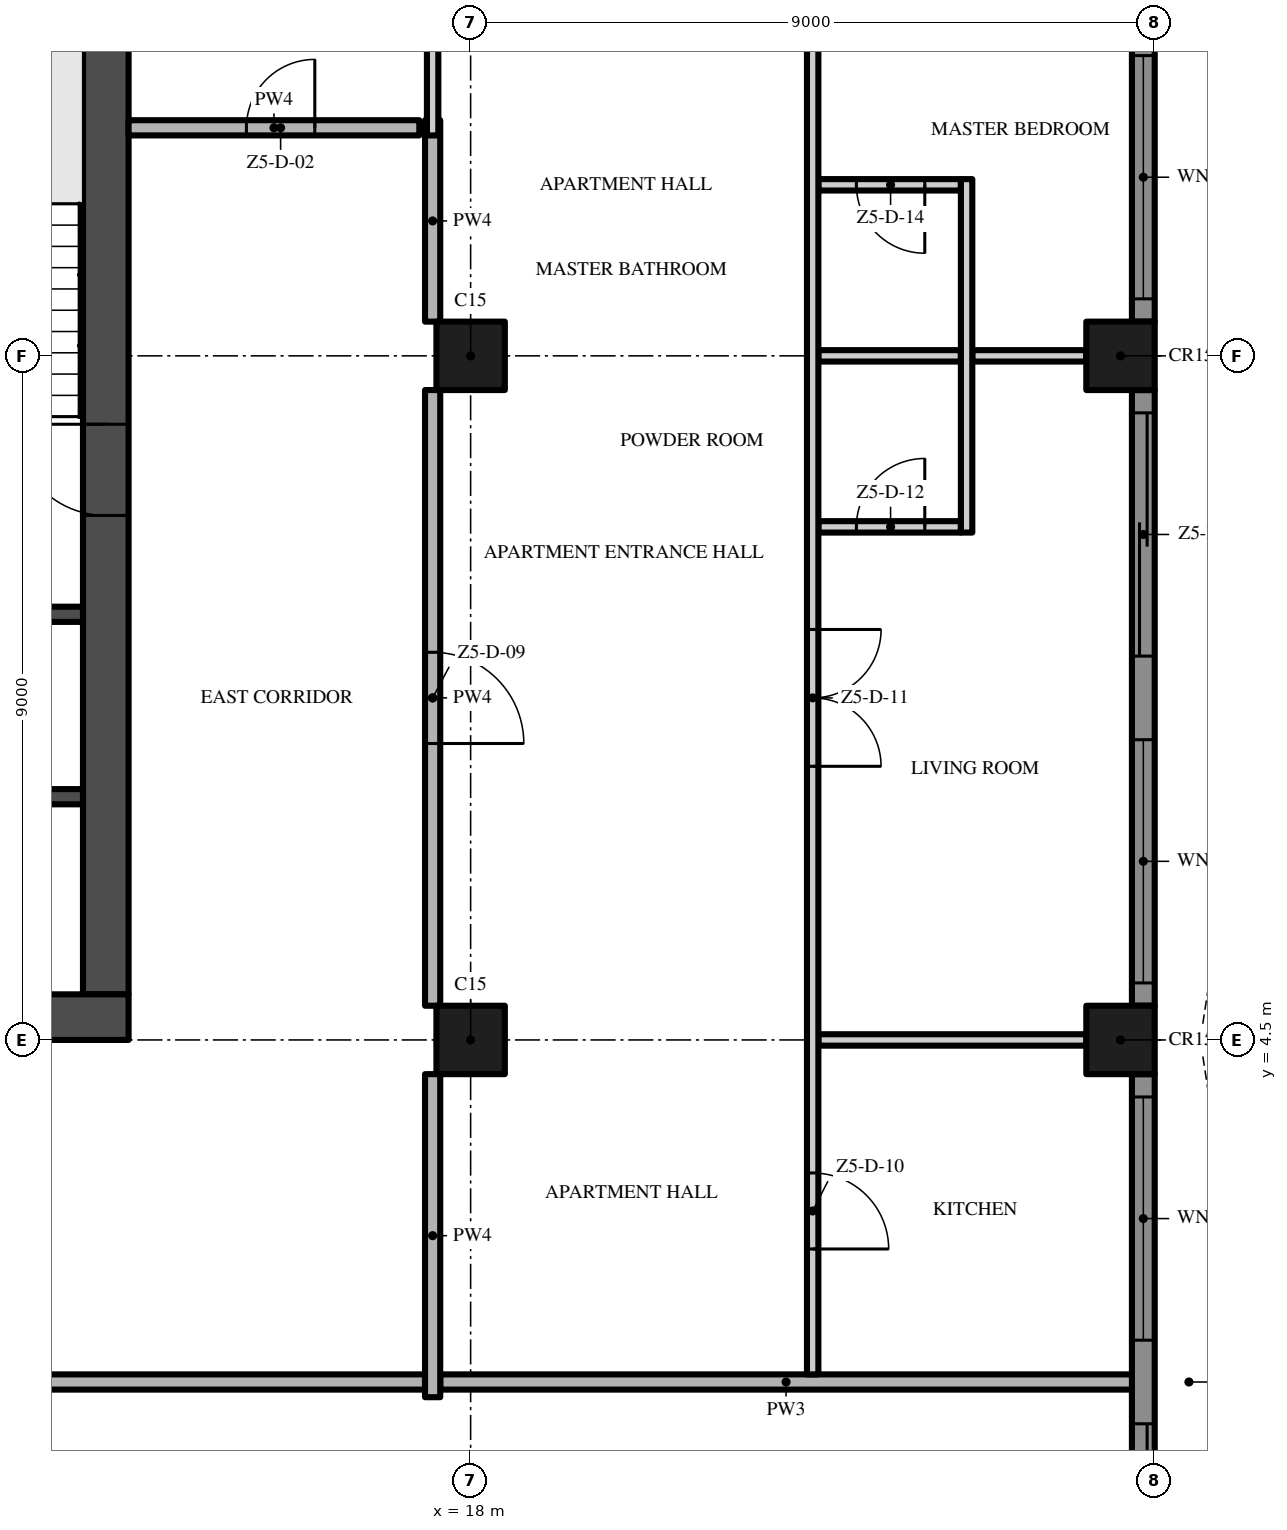
"""IFC4 building model, lengths in metres.
Left out: names, types, materials, properties, quantities, classifications, styles, units other than length and angle.
Written with IfcOpenShell. Run it as: python <this file> out.ifc"""

import sys

from ifc_helpers import new_model, si_unit, direction, frame, frame_2d, origin, origin_2d, place, context, subcontext, project, spatial, polyline, rectangle, outline, extrude, element, fill, save


model = new_model("IFC4")
c1 = context("Model", 3, precision=1e-05, world=origin(), true_north=direction((0.0, 1.0)))
c2 = subcontext(c1, "Body", "Model", "MODEL_VIEW")
j1 = project(units=[si_unit("LENGTHUNIT", "METRE"), si_unit("PLANEANGLEUNIT", "RADIAN")], contexts=[c1])
p1 = place(None, origin())
s1 = spatial("IfcSite", under=j1, at=p1, CompositionType="ELEMENT")
p2 = place(p1, origin())
s2 = spatial("IfcBuilding", under=s1, at=p2, CompositionType="ELEMENT")
p3 = place(p2, frame((0.0, 0.0, 280.6)))
s3 = spatial("IfcBuildingStorey", under=s2, at=p3, CompositionType="ELEMENT", Elevation=280.6)
p4 = place(p3, frame((-13.5, 4.8, -0.3), z_axis=(0.0, 0.0, 1.0), x_axis=(1.0, 0.0, 0.0)))
e1 = element("IfcWall", 1, at=p4, inside=s3, PredefinedType="SHEAR", context=c2, shape_type="SweptSolid", body=[
    extrude(rectangle(XDim=27.0, YDim=0.6, at=frame_2d((13.5, 0.0))), origin(), (0.0, 0.0, 1.0), 3.8),
])
p5 = place(p4, frame((12.0, 0.0, 0.3)))
e2 = element("IfcOpeningElement", 2, at=p5, cuts=e1, PredefinedType="OPENING", context=c2, shape_type="SweptSolid", body=[
    extrude(rectangle(XDim=3.0, YDim=2.4, at=frame_2d((1.5, 1.2))), frame((0.0, 0.31, 0.0), z_axis=(0.0, -1.0, 0.0), x_axis=(1.0, 0.0, 0.0)), (0.0, 0.0, 1.0), 0.62),
])
p6 = place(p4, frame((4.9, 0.0, 0.3)))
e3 = element("IfcOpeningElement", 3, at=p6, cuts=e1, PredefinedType="OPENING", context=c2, shape_type="SweptSolid", body=[
    extrude(rectangle(XDim=1.2, YDim=2.2, at=frame_2d((0.6, 1.1))), frame((0.0, 0.31, 0.0), z_axis=(0.0, -1.0, 0.0), x_axis=(1.0, 0.0, 0.0)), (0.0, 0.0, 1.0), 0.62),
])
p7 = place(p4, frame((20.75, 0.0, 0.3)))
e4 = element("IfcOpeningElement", 4, at=p7, cuts=e1, PredefinedType="OPENING", context=c2, shape_type="SweptSolid", body=[
    extrude(rectangle(XDim=1.5, YDim=2.2, at=frame_2d((0.75, 1.1))), frame((0.0, 0.31, 0.0), z_axis=(0.0, -1.0, 0.0), x_axis=(1.0, 0.0, 0.0)), (0.0, 0.0, 1.0), 0.62),
])
p8 = place(p4, frame((17.4, 0.0, 0.3)))
e5 = element("IfcOpeningElement", 5, at=p8, cuts=e1, PredefinedType="OPENING", context=c2, shape_type="SweptSolid", body=[
    extrude(rectangle(XDim=1.2, YDim=2.2, at=frame_2d((0.6, 1.1))), frame((0.0, 0.31, 0.0), z_axis=(0.0, -1.0, 0.0), x_axis=(1.0, 0.0, 0.0)), (0.0, 0.0, 1.0), 0.62),
])
p9 = place(p3, frame((13.2, 5.1, -0.3), z_axis=(0.0, 0.0, 1.0), x_axis=(0.0, 1.0, 0.0)))
e6 = element("IfcWall", 6, at=p9, inside=s3, PredefinedType="SHEAR", context=c2, shape_type="SweptSolid", body=[
    extrude(rectangle(XDim=16.8, YDim=0.6, at=frame_2d((8.4, 0.0))), origin(), (0.0, 0.0, 1.0), 3.8),
])
p10 = place(p9, frame((6.3, 0.0, 0.3)))
e7 = element("IfcOpeningElement", 7, at=p10, cuts=e6, PredefinedType="OPENING", context=c2, shape_type="SweptSolid", body=[
    extrude(rectangle(XDim=1.2, YDim=2.2, at=frame_2d((0.6, 1.1))), frame((0.0, 0.31, 0.0), z_axis=(0.0, -1.0, 0.0), x_axis=(1.0, 0.0, 0.0)), (0.0, 0.0, 1.0), 0.62),
])
for number, where, z_axis, x_axis in (
    (8, (18.0, 13.5, 0.0), (0.0, 0.0, 1.0), (1.0, 0.0, 0.0)),
    (9, (18.0, 4.5, 0.0), (0.0, 0.0, 1.0), (1.0, 0.0, 0.0)),
    (10, (26.55, 13.5, 0.0), (0.0, 0.0, 1.0), (1.0, 0.0, 0.0)),
    (11, (26.55, 4.5, 0.0), (0.0, 0.0, 1.0), (1.0, 0.0, 0.0)),
):
    element("IfcColumn", number, at=place(p3, frame(where, z_axis=z_axis, x_axis=x_axis)), inside=s3, PredefinedType="COLUMN", context=c2, shape_type="SweptSolid", body=[
        extrude(rectangle(XDim=0.9, YDim=0.9, at=origin_2d()), origin(), (0.0, 0.0, 1.0), 3.5),
    ])
p11 = place(p3, frame((26.85, 4.05, 0.0), z_axis=(0.0, 0.0, 1.0), x_axis=(0.0, -1.0, 0.0)))
e12 = element("IfcWall", 12, at=p11, inside=s3, PredefinedType="SOLIDWALL", context=c2, shape_type="SweptSolid", body=[
    extrude(rectangle(XDim=8.1, YDim=0.3, at=frame_2d((4.05, 0.0))), origin(), (0.0, 0.0, 1.0), 3.5),
])
p12 = place(p11, frame((4.6, 0.0, 0.0)))
e13 = element("IfcOpeningElement", 13, at=p12, cuts=e12, PredefinedType="OPENING", context=c2, shape_type="SweptSolid", body=[
    extrude(rectangle(XDim=3.2, YDim=2.4, at=frame_2d((1.6, 1.2))), frame((0.0, 0.16, 0.0), z_axis=(0.0, -1.0, 0.0), x_axis=(1.0, 0.0, 0.0)), (0.0, 0.0, 1.0), 0.32),
])
p13 = place(p11, frame((0.3, 0.0, 0.45)))
e14 = element("IfcOpeningElement", 14, at=p13, cuts=e12, PredefinedType="OPENING", context=c2, shape_type="SweptSolid", body=[
    extrude(rectangle(XDim=3.2, YDim=2.65, at=frame_2d((1.6, 1.325))), frame((0.0, 0.16, 0.0), z_axis=(0.0, -1.0, 0.0), x_axis=(1.0, 0.0, 0.0)), (0.0, 0.0, 1.0), 0.32),
])
p14 = place(p3, frame((26.85, 13.05, 0.0), z_axis=(0.0, 0.0, 1.0), x_axis=(0.0, -1.0, 0.0)))
e15 = element("IfcWall", 15, at=p14, inside=s3, PredefinedType="SOLIDWALL", context=c2, shape_type="SweptSolid", body=[
    extrude(rectangle(XDim=8.1, YDim=0.3, at=frame_2d((4.05, 0.0))), origin(), (0.0, 0.0, 1.0), 3.5),
])
p15 = place(p14, frame((4.6, 0.0, 0.45)))
e16 = element("IfcOpeningElement", 16, at=p15, cuts=e15, PredefinedType="OPENING", context=c2, shape_type="SweptSolid", body=[
    extrude(rectangle(XDim=3.2, YDim=2.65, at=frame_2d((1.6, 1.325))), frame((0.0, 0.16, 0.0), z_axis=(0.0, -1.0, 0.0), x_axis=(1.0, 0.0, 0.0)), (0.0, 0.0, 1.0), 0.32),
])
p16 = place(p14, frame((0.3, 0.0, 0.0)))
e17 = element("IfcOpeningElement", 17, at=p16, cuts=e15, PredefinedType="OPENING", context=c2, shape_type="SweptSolid", body=[
    extrude(rectangle(XDim=3.2, YDim=2.4, at=frame_2d((1.6, 1.2))), frame((0.0, 0.16, 0.0), z_axis=(0.0, -1.0, 0.0), x_axis=(1.0, 0.0, 0.0)), (0.0, 0.0, 1.0), 0.32),
])
p17 = place(p3, frame((26.85, 18.0, 0.0), z_axis=(0.0, 0.0, 1.0), x_axis=(0.0, -1.0, 0.0)))
e18 = element("IfcWall", 18, at=p17, inside=s3, PredefinedType="SOLIDWALL", context=c2, shape_type="SweptSolid", body=[
    extrude(rectangle(XDim=4.05, YDim=0.3, at=frame_2d((2.025, 0.0))), origin(), (0.0, 0.0, 1.0), 3.5),
])
p18 = place(p17, frame((0.55, 0.0, 0.45)))
e19 = element("IfcOpeningElement", 19, at=p18, cuts=e18, PredefinedType="OPENING", context=c2, shape_type="SweptSolid", body=[
    extrude(rectangle(XDim=3.2, YDim=2.65, at=frame_2d((1.6, 1.325))), frame((0.0, 0.16, 0.0), z_axis=(0.0, -1.0, 0.0), x_axis=(1.0, 0.0, 0.0)), (0.0, 0.0, 1.0), 0.32),
])
p19 = place(p3, origin())
e20 = element("IfcWall", 20, at=p19, inside=s3, PredefinedType="USERDEFINED", context=c2, shape_type="SweptSolid", body=[
    extrude(outline(polyline([(30.0, -18.0), (29.771, -16.5), (29.171, -15.0), (28.429, -13.5), (27.829, -12.0), (27.6, -10.5), (27.829, -9.0), (28.429, -7.5), (29.171, -6.0), (29.771, -4.5), (30.0, -3.0), (29.771, -1.5), (29.171, 0.0), (28.429, 1.5), (27.829, 3.0), (27.6, 4.5), (27.829, 6.0), (28.429, 7.5), (29.171, 9.0), (29.771, 10.5), (30.0, 12.0), (29.771, 13.5), (29.171, 15.0), (28.429, 16.5), (27.829, 18.0), (27.597, 17.907), (28.201, 16.398), (28.942, 14.898), (29.528, 13.434), (29.747, 12.0), (29.528, 10.566), (28.942, 9.102), (28.201, 7.602), (27.586, 6.066), (27.347, 4.5), (27.586, 2.934), (28.201, 1.398), (28.942, -0.102), (29.528, -1.566), (29.747, -3.0), (29.528, -4.434), (28.942, -5.898), (28.201, -7.398), (27.586, -8.934), (27.347, -10.5), (27.586, -12.066), (28.201, -13.602), (28.942, -15.102), (29.528, -16.566), (29.753, -18.038), (30.0, -18.0)])), origin(), (0.0, 0.0, 1.0), 0.9),
])
for number, where, z_axis, x_axis in (
    (21, (9.65, 7.7, 0.0), (0.0, 0.0, 1.0), (1.0, 0.0, 0.0)),
    (22, (9.65, 10.1, 0.0), (0.0, 0.0, 1.0), (1.0, 0.0, 0.0)),
):
    element("IfcWall", number, at=place(p3, frame(where, z_axis=z_axis, x_axis=x_axis)), inside=s3, PredefinedType="SHEAR", context=c2, shape_type="SweptSolid", body=[
        extrude(rectangle(XDim=3.25, YDim=0.2, at=frame_2d((1.625, 0.0))), origin(), (0.0, 0.0, 1.0), 3.5),
    ])
p20 = place(p3, frame((17.4, 0.0, 0.0), z_axis=(0.0, 0.0, 1.0), x_axis=(-1.0, 0.0, 0.0)))
e23 = element("IfcWall", 23, at=p20, inside=s3, PredefinedType="PARTITIONING", context=c2, shape_type="SweptSolid", body=[
    extrude(rectangle(XDim=34.8, YDim=0.2, at=frame_2d((17.4, 0.0))), origin(), (0.0, 0.0, 1.0), 3.5),
])
p21 = place(p20, frame((25.65, 0.0, 0.0)))
e24 = element("IfcOpeningElement", 24, at=p21, cuts=e23, PredefinedType="OPENING", context=c2, shape_type="SweptSolid", body=[
    extrude(rectangle(XDim=1.5, YDim=2.4, at=frame_2d((0.75, 1.2))), frame((0.0, 0.11, 0.0), z_axis=(0.0, -1.0, 0.0), x_axis=(1.0, 0.0, 0.0)), (0.0, 0.0, 1.0), 0.22),
])
p22 = place(p20, frame((7.65, 0.0, 0.0)))
e25 = element("IfcOpeningElement", 25, at=p22, cuts=e23, PredefinedType="OPENING", context=c2, shape_type="SweptSolid", body=[
    extrude(rectangle(XDim=1.5, YDim=2.4, at=frame_2d((0.75, 1.2))), frame((0.0, 0.11, 0.0), z_axis=(0.0, -1.0, 0.0), x_axis=(1.0, 0.0, 0.0)), (0.0, 0.0, 1.0), 0.22),
])
p23 = place(p3, frame((17.6, 0.0, 0.0), z_axis=(0.0, 0.0, 1.0), x_axis=(1.0, 0.0, 0.0)))
e26 = element("IfcWall", 26, at=p23, inside=s3, PredefinedType="PARTITIONING", context=c2, shape_type="SweptSolid", body=[
    extrude(rectangle(XDim=9.1, YDim=0.2, at=frame_2d((4.55, 0.0))), origin(), (0.0, 0.0, 1.0), 3.5),
])
p24 = place(p3, frame((22.575, 4.5, 0.0), z_axis=(0.0, 0.0, 1.0), x_axis=(1.0, 0.0, 0.0)))
e27 = element("IfcWall", 27, at=p24, inside=s3, PredefinedType="PARTITIONING", context=c2, shape_type="SweptSolid", body=[
    extrude(rectangle(XDim=3.525, YDim=0.15, at=frame_2d((1.762, 0.0))), origin(), (0.0, 0.0, 1.0), 3.5),
])
p25 = place(p3, frame((22.575, 11.25, 0.0), z_axis=(0.0, 0.0, 1.0), x_axis=(1.0, 0.0, 0.0)))
e28 = element("IfcWall", 28, at=p25, inside=s3, PredefinedType="PARTITIONING", context=c2, shape_type="SweptSolid", body=[
    extrude(rectangle(XDim=1.875, YDim=0.15, at=frame_2d((0.938, 0.0))), origin(), (0.0, 0.0, 1.0), 3.5),
])
p26 = place(p25, frame((0.5, 0.0, 0.0)))
e29 = element("IfcOpeningElement", 29, at=p26, cuts=e28, PredefinedType="OPENING", context=c2, shape_type="SweptSolid", body=[
    extrude(rectangle(XDim=0.9, YDim=2.1, at=frame_2d((0.45, 1.05))), frame((0.0, 0.085, 0.0), z_axis=(0.0, -1.0, 0.0), x_axis=(1.0, 0.0, 0.0)), (0.0, 0.0, 1.0), 0.17),
])
p27 = place(p3, frame((22.575, 13.5, 0.0), z_axis=(0.0, 0.0, 1.0), x_axis=(1.0, 0.0, 0.0)))
e30 = element("IfcWall", 30, at=p27, inside=s3, PredefinedType="PARTITIONING", context=c2, shape_type="SweptSolid", body=[
    extrude(rectangle(XDim=1.875, YDim=0.15, at=frame_2d((0.938, 0.0))), origin(), (0.0, 0.0, 1.0), 3.5),
])
p28 = place(p3, frame((24.6, 13.5, 0.0), z_axis=(0.0, 0.0, 1.0), x_axis=(1.0, 0.0, 0.0)))
e31 = element("IfcWall", 31, at=p28, inside=s3, PredefinedType="PARTITIONING", context=c2, shape_type="SweptSolid", body=[
    extrude(rectangle(XDim=1.5, YDim=0.15, at=frame_2d((0.75, 0.0))), origin(), (0.0, 0.0, 1.0), 3.5),
])
p29 = place(p3, frame((24.45, 15.75, 0.0), z_axis=(0.0, 0.0, 1.0), x_axis=(-1.0, 0.0, 0.0)))
e32 = element("IfcWall", 32, at=p29, inside=s3, PredefinedType="PARTITIONING", context=c2, shape_type="SweptSolid", body=[
    extrude(rectangle(XDim=1.875, YDim=0.15, at=frame_2d((0.938, 0.0))), origin(), (0.0, 0.0, 1.0), 3.5),
])
p30 = place(p29, frame((0.475, 0.0, 0.0)))
e33 = element("IfcOpeningElement", 33, at=p30, cuts=e32, PredefinedType="OPENING", context=c2, shape_type="SweptSolid", body=[
    extrude(rectangle(XDim=0.9, YDim=2.1, at=frame_2d((0.45, 1.05))), frame((0.0, 0.085, 0.0), z_axis=(0.0, -1.0, 0.0), x_axis=(1.0, 0.0, 0.0)), (0.0, 0.0, 1.0), 0.17),
])
p31 = place(p3, frame((13.5, 16.5, 0.0), z_axis=(0.0, 0.0, 1.0), x_axis=(1.0, 0.0, 0.0)))
e34 = element("IfcWall", 34, at=p31, inside=s3, PredefinedType="PARTITIONING", context=c2, shape_type="SweptSolid", body=[
    extrude(rectangle(XDim=3.825, YDim=0.2, at=frame_2d((1.913, 0.0))), origin(), (0.0, 0.0, 1.0), 3.5),
])
p32 = place(p31, frame((1.55, 0.0, 0.0)))
e35 = element("IfcOpeningElement", 35, at=p32, cuts=e34, PredefinedType="OPENING", context=c2, shape_type="SweptSolid", body=[
    extrude(rectangle(XDim=0.9, YDim=2.1, at=frame_2d((0.45, 1.05))), frame((0.0, 0.11, 0.0), z_axis=(0.0, -1.0, 0.0), x_axis=(1.0, 0.0, 0.0)), (0.0, 0.0, 1.0), 0.22),
])
p33 = place(p3, frame((17.5, -0.2, 0.0), z_axis=(0.0, 0.0, 1.0), x_axis=(0.0, 1.0, 0.0)))
e36 = element("IfcWall", 36, at=p33, inside=s3, PredefinedType="PARTITIONING", context=c2, shape_type="SweptSolid", body=[
    extrude(rectangle(XDim=4.25, YDim=0.2, at=frame_2d((2.125, 0.0))), origin(), (0.0, 0.0, 1.0), 3.5),
])
p34 = place(p3, frame((17.5, 13.05, 0.0), z_axis=(0.0, 0.0, 1.0), x_axis=(0.0, -1.0, 0.0)))
e37 = element("IfcWall", 37, at=p34, inside=s3, PredefinedType="PARTITIONING", context=c2, shape_type="SweptSolid", body=[
    extrude(rectangle(XDim=8.1, YDim=0.2, at=frame_2d((4.05, 0.0))), origin(), (0.0, 0.0, 1.0), 3.5),
])
p35 = place(p34, frame((3.45, 0.0, 0.0)))
e38 = element("IfcOpeningElement", 38, at=p35, cuts=e37, PredefinedType="OPENING", context=c2, shape_type="SweptSolid", body=[
    extrude(rectangle(XDim=1.2, YDim=2.4, at=frame_2d((0.6, 1.2))), frame((0.0, 0.11, 0.0), z_axis=(0.0, -1.0, 0.0), x_axis=(1.0, 0.0, 0.0)), (0.0, 0.0, 1.0), 0.22),
])
p36 = place(p3, frame((17.5, 13.95, 0.0), z_axis=(0.0, 0.0, 1.0), x_axis=(0.0, 1.0, 0.0)))
e39 = element("IfcWall", 39, at=p36, inside=s3, PredefinedType="PARTITIONING", context=c2, shape_type="SweptSolid", body=[
    extrude(rectangle(XDim=2.65, YDim=0.2, at=frame_2d((1.325, 0.0))), origin(), (0.0, 0.0, 1.0), 3.5),
])
p37 = place(p3, frame((17.5, 16.4, 0.0), z_axis=(0.0, 0.0, 1.0), x_axis=(0.0, 1.0, 0.0)))
e40 = element("IfcWall", 40, at=p37, inside=s3, PredefinedType="PARTITIONING", context=c2, shape_type="SweptSolid", body=[
    extrude(rectangle(XDim=5.2, YDim=0.15, at=frame_2d((2.6, 0.0))), origin(), (0.0, 0.0, 1.0), 3.5),
])
p38 = place(p3, frame((22.5, 17.55, 0.0), z_axis=(0.0, 0.0, 1.0), x_axis=(0.0, -1.0, 0.0)))
e41 = element("IfcWall", 41, at=p38, inside=s3, PredefinedType="PARTITIONING", context=c2, shape_type="SweptSolid", body=[
    extrude(rectangle(XDim=17.45, YDim=0.15, at=frame_2d((8.725, 0.0))), origin(), (0.0, 0.0, 1.0), 3.5),
])
p39 = place(p38, frame((14.8, 0.0, 0.0)))
e42 = element("IfcOpeningElement", 42, at=p39, cuts=e41, PredefinedType="OPENING", context=c2, shape_type="SweptSolid", body=[
    extrude(rectangle(XDim=1.0, YDim=2.4, at=frame_2d((0.5, 1.2))), frame((0.0, 0.085, 0.0), z_axis=(0.0, -1.0, 0.0), x_axis=(1.0, 0.0, 0.0)), (0.0, 0.0, 1.0), 0.17),
])
p40 = place(p38, frame((7.65, 0.0, 0.0)))
e43 = element("IfcOpeningElement", 43, at=p40, cuts=e41, PredefinedType="OPENING", context=c2, shape_type="SweptSolid", body=[
    extrude(rectangle(XDim=1.8, YDim=2.4, at=frame_2d((0.9, 1.2))), frame((0.0, 0.085, 0.0), z_axis=(0.0, -1.0, 0.0), x_axis=(1.0, 0.0, 0.0)), (0.0, 0.0, 1.0), 0.17),
])
p41 = place(p3, frame((24.525, 11.175, 0.0), z_axis=(0.0, 0.0, 1.0), x_axis=(0.0, 1.0, 0.0)))
e44 = element("IfcWall", 44, at=p41, inside=s3, PredefinedType="PARTITIONING", context=c2, shape_type="SweptSolid", body=[
    extrude(rectangle(XDim=4.65, YDim=0.15, at=frame_2d((2.325, 0.0))), origin(), (0.0, 0.0, 1.0), 3.5),
])
p42 = place(p12, origin())
e45 = element("IfcDoor", 45, at=p42, inside=s3, OperationType="SINGLE_SWING_LEFT", PredefinedType="DOOR", context=c2, shape_type="SweptSolid", body=[
    extrude(rectangle(XDim=3.2, YDim=2.4, at=frame_2d((1.6, 1.2))), frame((0.0, 0.025, 0.0), z_axis=(0.0, -1.0, 0.0), x_axis=(1.0, 0.0, 0.0)), (0.0, 0.0, 1.0), 0.05),
])
fill(e13, e45)
p43 = place(p13, origin())
e46 = element("IfcWindow", 46, at=p43, inside=s3, PartitioningType="SINGLE_PANEL", PredefinedType="WINDOW", context=c2, shape_type="SweptSolid", body=[
    extrude(rectangle(XDim=3.2, YDim=2.65, at=frame_2d((1.6, 1.325))), frame((0.0, 0.03, 0.0), z_axis=(0.0, -1.0, 0.0), x_axis=(1.0, 0.0, 0.0)), (0.0, 0.0, 1.0), 0.06),
])
fill(e14, e46)
p44 = place(p15, origin())
e47 = element("IfcWindow", 47, at=p44, inside=s3, PartitioningType="SINGLE_PANEL", PredefinedType="WINDOW", context=c2, shape_type="SweptSolid", body=[
    extrude(rectangle(XDim=3.2, YDim=2.65, at=frame_2d((1.6, 1.325))), frame((0.0, 0.03, 0.0), z_axis=(0.0, -1.0, 0.0), x_axis=(1.0, 0.0, 0.0)), (0.0, 0.0, 1.0), 0.06),
])
fill(e16, e47)
p45 = place(p16, origin())
e48 = element("IfcDoor", 48, at=p45, inside=s3, OperationType="SINGLE_SWING_LEFT", PredefinedType="DOOR", context=c2, shape_type="SweptSolid", body=[
    extrude(rectangle(XDim=3.2, YDim=2.4, at=frame_2d((1.6, 1.2))), frame((0.0, 0.025, 0.0), z_axis=(0.0, -1.0, 0.0), x_axis=(1.0, 0.0, 0.0)), (0.0, 0.0, 1.0), 0.05),
])
fill(e17, e48)
p46 = place(p18, origin())
e49 = element("IfcWindow", 49, at=p46, inside=s3, PartitioningType="SINGLE_PANEL", PredefinedType="WINDOW", context=c2, shape_type="SweptSolid", body=[
    extrude(rectangle(XDim=3.2, YDim=2.65, at=frame_2d((1.6, 1.325))), frame((0.0, 0.03, 0.0), z_axis=(0.0, -1.0, 0.0), x_axis=(1.0, 0.0, 0.0)), (0.0, 0.0, 1.0), 0.06),
])
fill(e19, e49)
p47 = place(p10, frame((1.2, 0.0, 0.0), z_axis=(0.0, 0.0, 1.0), x_axis=(-1.0, 0.0, 0.0)))
e50 = element("IfcDoor", 50, at=p47, inside=s3, OperationType="SINGLE_SWING_LEFT", PredefinedType="DOOR", context=c2, shape_type="SweptSolid", body=[
    extrude(rectangle(XDim=1.2, YDim=2.2, at=frame_2d((0.6, 1.1))), frame((0.0, 0.025, 0.0), z_axis=(0.0, -1.0, 0.0), x_axis=(1.0, 0.0, 0.0)), (0.0, 0.0, 1.0), 0.05),
])
fill(e7, e50)
p48 = place(p32, origin())
e51 = element("IfcDoor", 51, at=p48, inside=s3, OperationType="SINGLE_SWING_RIGHT", PredefinedType="DOOR", context=c2, shape_type="SweptSolid", body=[
    extrude(rectangle(XDim=0.9, YDim=2.1, at=frame_2d((0.45, 1.05))), frame((0.0, 0.025, 0.0), z_axis=(0.0, -1.0, 0.0), x_axis=(1.0, 0.0, 0.0)), (0.0, 0.0, 1.0), 0.05),
])
fill(e35, e51)
p49 = place(p35, origin())
e52 = element("IfcDoor", 52, at=p49, inside=s3, OperationType="SINGLE_SWING_RIGHT", PredefinedType="DOOR", context=c2, shape_type="SweptSolid", body=[
    extrude(rectangle(XDim=1.2, YDim=2.4, at=frame_2d((0.6, 1.2))), frame((0.0, 0.025, 0.0), z_axis=(0.0, -1.0, 0.0), x_axis=(1.0, 0.0, 0.0)), (0.0, 0.0, 1.0), 0.05),
])
fill(e38, e52)
p50 = place(p39, origin())
e53 = element("IfcDoor", 53, at=p50, inside=s3, OperationType="SINGLE_SWING_RIGHT", PredefinedType="DOOR", context=c2, shape_type="SweptSolid", body=[
    extrude(rectangle(XDim=1.0, YDim=2.4, at=frame_2d((0.5, 1.2))), frame((0.0, 0.025, 0.0), z_axis=(0.0, -1.0, 0.0), x_axis=(1.0, 0.0, 0.0)), (0.0, 0.0, 1.0), 0.05),
])
fill(e42, e53)
p51 = place(p40, origin())
e54 = element("IfcDoor", 54, at=p51, inside=s3, OperationType="DOUBLE_DOOR_SINGLE_SWING", PredefinedType="DOOR", context=c2, shape_type="SweptSolid", body=[
    extrude(rectangle(XDim=1.8, YDim=2.4, at=frame_2d((0.9, 1.2))), frame((0.0, 0.025, 0.0), z_axis=(0.0, -1.0, 0.0), x_axis=(1.0, 0.0, 0.0)), (0.0, 0.0, 1.0), 0.05),
])
fill(e43, e54)
p52 = place(p26, origin())
e55 = element("IfcDoor", 55, at=p52, inside=s3, OperationType="SINGLE_SWING_RIGHT", PredefinedType="DOOR", context=c2, shape_type="SweptSolid", body=[
    extrude(rectangle(XDim=0.9, YDim=2.1, at=frame_2d((0.45, 1.05))), frame((0.0, 0.025, 0.0), z_axis=(0.0, -1.0, 0.0), x_axis=(1.0, 0.0, 0.0)), (0.0, 0.0, 1.0), 0.05),
])
fill(e29, e55)
p53 = place(p30, origin())
e56 = element("IfcDoor", 56, at=p53, inside=s3, OperationType="SINGLE_SWING_LEFT", PredefinedType="DOOR", context=c2, shape_type="SweptSolid", body=[
    extrude(rectangle(XDim=0.9, YDim=2.1, at=frame_2d((0.45, 1.05))), frame((0.0, 0.025, 0.0), z_axis=(0.0, -1.0, 0.0), x_axis=(1.0, 0.0, 0.0)), (0.0, 0.0, 1.0), 0.05),
])
fill(e33, e56)
save(model, sys.argv[1])
